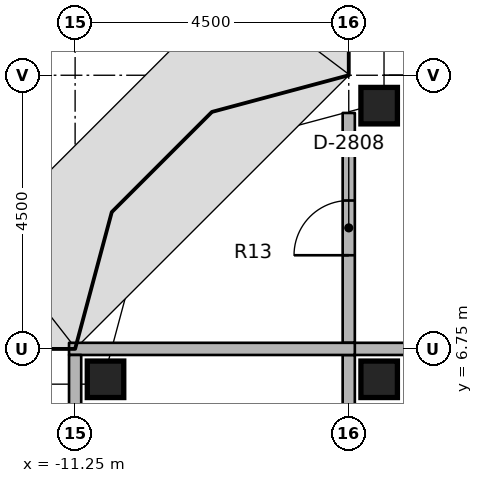
"""IFC4 building model, lengths in metres.
Left out: names, types, materials, properties, quantities, classifications, styles, units other than length and angle.
Written with IfcOpenShell. Run it as: python <this file> out.ifc"""

import sys

from ifc_helpers import new_model, si_unit, direction, frame, frame_2d, origin, origin_2d, place, context, subcontext, project, spatial, rectangle, extrude, element, fill, save


model = new_model("IFC4")
c1 = context("Model", 3, precision=1e-05, world=origin(), true_north=direction((0.0, 1.0)))
c2 = subcontext(c1, "Body", "Model", "MODEL_VIEW")
j1 = project(units=[si_unit("LENGTHUNIT", "METRE"), si_unit("PLANEANGLEUNIT", "RADIAN")], contexts=[c1])
p1 = place(None, origin())
s1 = spatial("IfcSite", under=j1, at=p1, CompositionType="ELEMENT")
p2 = place(p1, origin())
s2 = spatial("IfcBuilding", under=s1, at=p2, CompositionType="ELEMENT")
p3 = place(p2, frame((0.0, 0.0, 265.0)))
s3 = spatial("IfcBuildingStorey", under=s2, at=p3, CompositionType="ELEMENT", Elevation=265.0)
for number, where, z_axis, x_axis in (
    (1, (-10.75, 6.25, 0.0), (0.0, 0.0, 1.0), (1.0, 0.0, 0.0)),
    (2, (-6.25, 6.25, 0.0), (0.0, 0.0, 1.0), (1.0, 0.0, 0.0)),
    (3, (-6.25, 10.75, 0.0), (0.0, 0.0, 1.0), (1.0, 0.0, 0.0)),
):
    element("IfcColumn", number, at=place(p3, frame(where, z_axis=z_axis, x_axis=x_axis)), inside=s3, PredefinedType="COLUMN", context=c2, shape_type="SweptSolid", body=[
        extrude(rectangle(XDim=0.6, YDim=0.6, at=origin_2d()), origin(), (0.0, 0.0, 1.0), 3.65),
    ])
p4 = place(p3, frame((-6.85, 6.75, 0.0), z_axis=(0.0, 0.0, 1.0), x_axis=(1.0, 0.0, 0.0)))
e4 = element("IfcWall", 4, at=p4, inside=s3, PredefinedType="PARTITIONING", context=c2, shape_type="SweptSolid", body=[
    extrude(rectangle(XDim=5.825, YDim=0.2, at=frame_2d((2.913, 0.0))), origin(), (0.0, 0.0, 1.0), 2.75),
])
p5 = place(p3, frame((-6.75, 6.85, 0.0), z_axis=(0.0, 0.0, 1.0), x_axis=(0.0, 1.0, 0.0)))
e5 = element("IfcWall", 5, at=p5, inside=s3, PredefinedType="PARTITIONING", context=c2, shape_type="SweptSolid", body=[
    extrude(rectangle(XDim=3.78, YDim=0.2, at=frame_2d((1.89, 0.0))), origin(), (0.0, 0.0, 1.0), 2.75),
])
p6 = place(p5, frame((1.44, 0.0, 0.0)))
e6 = element("IfcOpeningElement", 6, at=p6, cuts=e5, PredefinedType="OPENING", context=c2, shape_type="SweptSolid", body=[
    extrude(rectangle(XDim=0.9, YDim=2.1, at=frame_2d((0.45, 1.05))), frame((0.0, 0.11, 0.0), z_axis=(0.0, -1.0, 0.0), x_axis=(1.0, 0.0, 0.0)), (0.0, 0.0, 1.0), 0.22),
])
p7 = place(p3, frame((-6.75, 1.225, 0.0), z_axis=(0.0, 0.0, 1.0), x_axis=(0.0, 1.0, 0.0)))
e7 = element("IfcWall", 7, at=p7, inside=s3, PredefinedType="PARTITIONING", context=c2, shape_type="SweptSolid", body=[
    extrude(rectangle(XDim=5.425, YDim=0.2, at=frame_2d((2.712, 0.0))), origin(), (0.0, 0.0, 1.0), 2.75),
])
p8 = place(p3, frame((-11.35, 6.75, 0.0), z_axis=(0.0, 0.0, 1.0), x_axis=(1.0, 0.0, 0.0)))
e8 = element("IfcWall", 8, at=p8, inside=s3, PredefinedType="PARTITIONING", context=c2, shape_type="SweptSolid", body=[
    extrude(rectangle(XDim=4.7, YDim=0.2, at=frame_2d((2.35, 0.0))), origin(), (0.0, 0.0, 1.0), 2.75),
])
p9 = place(p3, frame((-11.25, 1.225, 0.0), z_axis=(0.0, 0.0, 1.0), x_axis=(0.0, 1.0, 0.0)))
e9 = element("IfcWall", 9, at=p9, inside=s3, PredefinedType="PARTITIONING", context=c2, shape_type="SweptSolid", body=[
    extrude(rectangle(XDim=5.425, YDim=0.2, at=frame_2d((2.712, 0.0))), origin(), (0.0, 0.0, 1.0), 2.75),
])
p10 = place(p6, origin())
e10 = element("IfcDoor", 10, at=p10, inside=s3, OperationType="SINGLE_SWING_LEFT", PredefinedType="DOOR", context=c2, shape_type="SweptSolid", body=[
    extrude(rectangle(XDim=0.9, YDim=2.1, at=frame_2d((0.45, 1.05))), frame((0.0, 0.025, 0.0), z_axis=(0.0, -1.0, 0.0), x_axis=(1.0, 0.0, 0.0)), (0.0, 0.0, 1.0), 0.05),
])
fill(e6, e10)
save(model, sys.argv[1])
